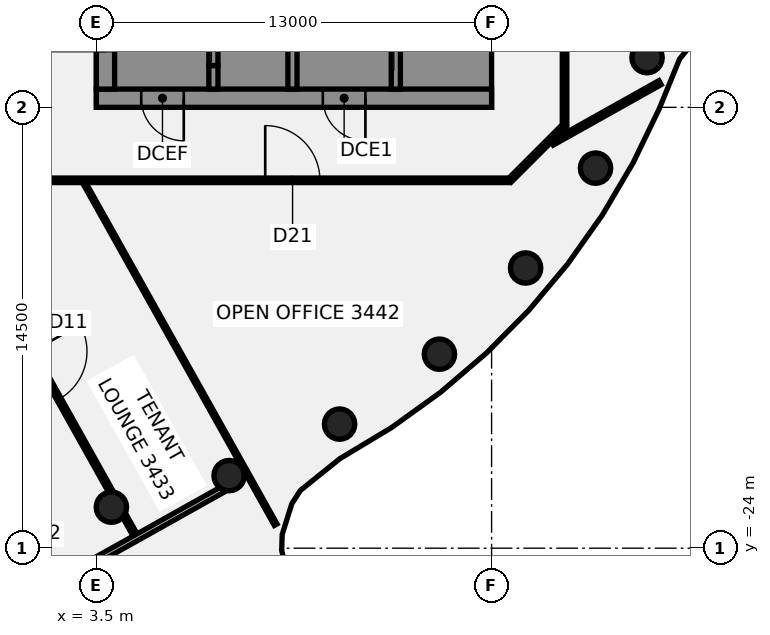
"""IFC4 building model, lengths in metres.
Left out: names, types, materials, properties, quantities, classifications, styles, units other than length and angle.
Written with IfcOpenShell. Run it as: python <this file> out.ifc"""

import sys

from ifc_helpers import new_model, si_unit, direction, frame, frame_2d, origin, origin_2d, place, context, subcontext, project, spatial, polyline, rectangle, circle, outline, extrude, element, fill, save


model = new_model("IFC4")
c1 = context("Model", 3, precision=1e-05, world=origin(), true_north=direction((0.0, 1.0)))
c2 = subcontext(c1, "Body", "Model", "MODEL_VIEW")
j1 = project(units=[si_unit("LENGTHUNIT", "METRE"), si_unit("PLANEANGLEUNIT", "RADIAN")], contexts=[c1])
p1 = place(None, origin())
s1 = spatial("IfcSite", under=j1, at=p1, CompositionType="ELEMENT")
p2 = place(p1, origin())
s2 = spatial("IfcBuilding", under=s1, at=p2, CompositionType="ELEMENT")
p3 = place(p2, frame((0.0, 0.0, 140.5)))
s3 = spatial("IfcBuildingStorey", under=s2, at=p3, CompositionType="ELEMENT", Elevation=140.5)
for number, where, z_axis, x_axis in (
    (1, (3.994, -22.651, -0.14), (0.0, 0.0, 1.0), (1.0, 0.0, 0.0)),
    (2, (7.866, -21.613, -0.14), (0.0, 0.0, 1.0), (1.0, 0.0, 0.0)),
    (3, (11.5, -19.919, -0.14), (0.0, 0.0, 1.0), (1.0, 0.0, 0.0)),
    (4, (14.784, -17.619, -0.14), (0.0, 0.0, 1.0), (1.0, 0.0, 0.0)),
    (5, (17.619, -14.784, -0.14), (0.0, 0.0, 1.0), (1.0, 0.0, 0.0)),
    (6, (19.919, -11.5, -0.14), (0.0, 0.0, 1.0), (1.0, 0.0, 0.0)),
    (7, (21.613, -7.866, -0.14), (0.0, 0.0, 1.0), (1.0, 0.0, 0.0)),
):
    element("IfcColumn", number, at=place(p3, frame(where, z_axis=z_axis, x_axis=x_axis)), inside=s3, PredefinedType="COLUMN", context=c2, shape_type="SweptSolid", body=[
        extrude(circle(Radius=0.5, at=origin_2d()), origin(), (0.0, 0.0, 1.0), 3.75),
    ])
p4 = place(p3, frame((-1.706, -11.996, 0.0), z_axis=(0.0, 0.0, 1.0), x_axis=(0.488648105698, -0.872480961854, 0.0)))
e8 = element("IfcWall", 8, at=p4, inside=s3, PredefinedType="PARTITIONING", context=c2, shape_type="SweptSolid", body=[
    extrude(rectangle(XDim=11.632, YDim=0.15, at=frame_2d((5.816, 0.0))), origin(), (0.0, 0.0, 1.0), 3.01),
])
p5 = place(p4, frame((6.34, 0.0, 0.0)))
e9 = element("IfcOpeningElement", 9, at=p5, cuts=e8, PredefinedType="OPENING", context=c2, shape_type="SweptSolid", body=[
    extrude(rectangle(XDim=1.8, YDim=2.1, at=frame_2d((0.9, 1.05))), frame((0.0, 0.085, 0.0), z_axis=(0.0, -1.0, 0.0), x_axis=(1.0, 0.0, 0.0)), (0.0, 0.0, 1.0), 0.17),
])
p6 = place(p3, frame((4.415, -22.926, 0.0), z_axis=(0.0, 0.0, 1.0), x_axis=(0.488461705481, -0.872585332376, 0.0)))
e10 = element("IfcWall", 10, at=p6, inside=s3, PredefinedType="PARTITIONING", context=c2, shape_type="SweptSolid", body=[
    extrude(rectangle(XDim=0.735, YDim=0.15, at=frame_2d((0.367, 0.0))), origin(), (0.0, 0.0, 1.0), 3.01),
])
p7 = place(p3, frame((3.1, -11.983, 0.0), z_axis=(0.0, 0.0, 1.0), x_axis=(0.488708932558, -0.87244689193, 0.0)))
e11 = element("IfcWall", 11, at=p7, inside=s3, PredefinedType="PARTITIONING", context=c2, shape_type="SweptSolid", body=[
    extrude(rectangle(XDim=12.887, YDim=0.1, at=frame_2d((6.444, 0.0))), origin(), (0.0, 0.0, 1.0), 3.01),
])
p8 = place(p3, frame((-17.1, -11.9, 0.0), z_axis=(0.0, 0.0, 1.0), x_axis=(1.0, 0.0, 0.0)))
e12 = element("IfcWall", 12, at=p8, inside=s3, PredefinedType="PARTITIONING", context=c2, shape_type="SweptSolid", body=[
    extrude(rectangle(XDim=34.165, YDim=0.15, at=frame_2d((17.083, 0.0))), origin(), (0.0, 0.0, 1.0), 3.01),
])
p9 = place(p8, frame((10.546, 0.0, 0.0)))
e13 = element("IfcOpeningElement", 13, at=p9, cuts=e12, PredefinedType="OPENING", context=c2, shape_type="SweptSolid", body=[
    extrude(rectangle(XDim=1.8, YDim=2.1, at=frame_2d((0.9, 1.05))), frame((0.0, 0.085, 0.0), z_axis=(0.0, -1.0, 0.0), x_axis=(1.0, 0.0, 0.0)), (0.0, 0.0, 1.0), 0.17),
])
p10 = place(p8, frame((2.7, 0.0, 0.0)))
e14 = element("IfcOpeningElement", 14, at=p10, cuts=e12, PredefinedType="OPENING", context=c2, shape_type="SweptSolid", body=[
    extrude(rectangle(XDim=1.8, YDim=2.1, at=frame_2d((0.9, 1.05))), frame((0.0, 0.085, 0.0), z_axis=(0.0, -1.0, 0.0), x_axis=(1.0, 0.0, 0.0)), (0.0, 0.0, 1.0), 0.17),
])
p11 = place(p8, frame((26.154, 0.0, 0.0)))
e15 = element("IfcOpeningElement", 15, at=p11, cuts=e12, PredefinedType="OPENING", context=c2, shape_type="SweptSolid", body=[
    extrude(rectangle(XDim=1.8, YDim=2.1, at=frame_2d((0.9, 1.05))), frame((0.0, 0.085, 0.0), z_axis=(0.0, -1.0, 0.0), x_axis=(1.0, 0.0, 0.0)), (0.0, 0.0, 1.0), 0.17),
])
p12 = place(p3, frame((-3.987, -28.59, 0.0), z_axis=(0.0, 0.0, 1.0), x_axis=(0.87241990638, 0.488757104247, 0.0)))
e16 = element("IfcWall", 16, at=p12, inside=s3, PredefinedType="PARTITIONING", context=c2, shape_type="SweptSolid", body=[
    extrude(rectangle(XDim=13.346, YDim=0.2, at=frame_2d((6.673, 0.0))), origin(), (0.0, 0.0, 1.0), 3.01),
])
p13 = place(p12, frame((5.799, 0.0, 0.0)))
e17 = element("IfcOpeningElement", 17, at=p13, cuts=e16, PredefinedType="OPENING", context=c2, shape_type="SweptSolid", body=[
    extrude(rectangle(XDim=1.4, YDim=2.1, at=frame_2d((0.7, 1.05))), frame((0.0, 0.11, 0.0), z_axis=(0.0, -1.0, 0.0), x_axis=(1.0, 0.0, 0.0)), (0.0, 0.0, 1.0), 0.22),
])
p14 = place(p3, frame((18.494, -10.675, 0.0), z_axis=(0.0, 0.0, 1.0), x_axis=(0.872412835083, 0.488769726131, 0.0)))
e18 = element("IfcWall", 18, at=p14, inside=s3, PredefinedType="PARTITIONING", context=c2, shape_type="SweptSolid", body=[
    extrude(rectangle(XDim=4.066, YDim=0.15, at=frame_2d((2.033, 0.0))), origin(), (0.0, 0.0, 1.0), 3.01),
])
p15 = place(p3, frame((17.1, -11.9, 0.0), z_axis=(0.0, 0.0, 1.0), x_axis=(0.707106781187, 0.707106781187, 0.0)))
e19 = element("IfcWall", 19, at=p15, inside=s3, PredefinedType="PARTITIONING", context=c2, shape_type="SweptSolid", body=[
    extrude(rectangle(XDim=2.505, YDim=0.15, at=frame_2d((1.253, 0.0))), origin(), (0.0, 0.0, 1.0), 3.01),
])
p16 = place(p3, frame((18.9, -10.1, 0.0), z_axis=(0.0, 0.0, 1.0), x_axis=(0.0, 1.0, 0.0)))
e20 = element("IfcWall", 20, at=p16, inside=s3, PredefinedType="PARTITIONING", context=c2, shape_type="SweptSolid", body=[
    extrude(rectangle(XDim=20.2, YDim=0.15, at=frame_2d((10.1, 0.0))), origin(), (0.0, 0.0, 1.0), 3.01),
])
p17 = place(p16, frame((8.367, 0.0, 0.0)))
e21 = element("IfcOpeningElement", 21, at=p17, cuts=e20, PredefinedType="OPENING", context=c2, shape_type="SweptSolid", body=[
    extrude(rectangle(XDim=1.8, YDim=2.1, at=frame_2d((0.9, 1.05))), frame((0.0, 0.085, 0.0), z_axis=(0.0, -1.0, 0.0), x_axis=(1.0, 0.0, 0.0)), (0.0, 0.0, 1.0), 0.17),
])
p18 = place(p16, frame((13.611, 0.0, 0.0)))
e22 = element("IfcOpeningElement", 22, at=p18, cuts=e20, PredefinedType="OPENING", context=c2, shape_type="SweptSolid", body=[
    extrude(rectangle(XDim=0.9, YDim=2.1, at=frame_2d((0.45, 1.05))), frame((0.0, 0.085, 0.0), z_axis=(0.0, -1.0, 0.0), x_axis=(1.0, 0.0, 0.0)), (0.0, 0.0, 1.0), 0.17),
])
p19 = place(p3, frame((16.5, -9.2, 0.0), z_axis=(0.0, 0.0, 1.0), x_axis=(-1.0, 0.0, 0.0)))
e23 = element("IfcWall", 23, at=p19, inside=s3, PredefinedType="SHEAR", context=c2, shape_type="SweptSolid", body=[
    extrude(rectangle(XDim=13.0, YDim=0.6, at=frame_2d((6.5, 0.0))), origin(), (0.0, 0.0, 1.0), 3.61),
])
p20 = place(p19, frame((4.15, 0.0, 0.0)))
e24 = element("IfcOpeningElement", 24, at=p20, cuts=e23, PredefinedType="OPENING", context=c2, shape_type="SweptSolid", body=[
    extrude(rectangle(XDim=1.4, YDim=2.1, at=frame_2d((0.7, 1.05))), frame((0.0, 0.31, 0.0), z_axis=(0.0, -1.0, 0.0), x_axis=(1.0, 0.0, 0.0)), (0.0, 0.0, 1.0), 0.62),
])
p21 = place(p19, frame((10.125, 0.0, 0.0)))
e25 = element("IfcOpeningElement", 25, at=p21, cuts=e23, PredefinedType="OPENING", context=c2, shape_type="SweptSolid", body=[
    extrude(rectangle(XDim=1.4, YDim=2.1, at=frame_2d((0.7, 1.05))), frame((0.0, 0.31, 0.0), z_axis=(0.0, -1.0, 0.0), x_axis=(1.0, 0.0, 0.0)), (0.0, 0.0, 1.0), 0.62),
])
p22 = place(p3, origin())
e26 = element("IfcWall", 26, at=p22, inside=s3, PredefinedType="SHEAR", context=c2, shape_type="SweptSolid", body=[
    extrude(outline(polyline([(13.5, -8.125), (13.5, -8.9), (15.9, -8.9), (16.5, -8.9), (16.5, 8.9), (15.9, 8.9), (13.5, 8.9), (13.5, 8.125), (15.9, 8.125), (15.9, 5.625), (13.5, 5.625), (13.5, 5.375), (15.9, 5.375), (15.9, -5.375), (13.5, -5.375), (13.5, -5.625), (15.9, -5.625), (15.9, -8.125), (13.5, -8.125)])), origin(), (0.0, 0.0, 1.0), 3.61),
])
p23 = place(p3, origin())
e27 = element("IfcWall", 27, at=p23, inside=s3, PredefinedType="SHEAR", context=c2, shape_type="SweptSolid", body=[
    extrude(outline(polyline([(7.5, -8.125), (7.5, -8.9), (9.8, -8.9), (9.8, -8.125), (9.8, -5.625), (9.55, -5.625), (9.55, -8.125), (7.5, -8.125)])), origin(), (0.0, 0.0, 1.0), 3.61),
])
p24 = place(p3, frame((7.35, -8.9, 0.0), z_axis=(0.0, 0.0, 1.0), x_axis=(0.0, 1.0, 0.0)))
e28 = element("IfcWall", 28, at=p24, inside=s3, PredefinedType="SHEAR", context=c2, shape_type="SweptSolid", body=[
    extrude(rectangle(XDim=0.775, YDim=0.3, at=frame_2d((0.387, 0.0))), origin(), (0.0, 0.0, 1.0), 3.61),
])
p25 = place(p3, frame((13.35, -8.9, 0.0), z_axis=(0.0, 0.0, 1.0), x_axis=(0.0, 1.0, 0.0)))
e29 = element("IfcWall", 29, at=p25, inside=s3, PredefinedType="SHEAR", context=c2, shape_type="SweptSolid", body=[
    extrude(rectangle(XDim=17.8, YDim=0.3, at=frame_2d((8.9, 0.0))), origin(), (0.0, 0.0, 1.0), 3.61),
])
p26 = place(p25, frame((1.325, 0.0, 0.0)))
e30 = element("IfcOpeningElement", 30, at=p26, cuts=e29, PredefinedType="OPENING", context=c2, shape_type="SweptSolid", body=[
    extrude(rectangle(XDim=1.4, YDim=2.1, at=frame_2d((0.7, 1.05))), frame((0.0, 0.16, 0.0), z_axis=(0.0, -1.0, 0.0), x_axis=(1.0, 0.0, 0.0)), (0.0, 0.0, 1.0), 0.32),
])
p27 = place(p25, frame((6.546, 0.0, 0.0)))
e31 = element("IfcOpeningElement", 31, at=p27, cuts=e29, PredefinedType="OPENING", context=c2, shape_type="SweptSolid", body=[
    extrude(rectangle(XDim=1.0, YDim=2.1, at=frame_2d((0.5, 1.05))), frame((0.0, 0.16, 0.0), z_axis=(0.0, -1.0, 0.0), x_axis=(1.0, 0.0, 0.0)), (0.0, 0.0, 1.0), 0.32),
])
p28 = place(p25, frame((12.046, 0.0, 0.0)))
e32 = element("IfcOpeningElement", 32, at=p28, cuts=e29, PredefinedType="OPENING", context=c2, shape_type="SweptSolid", body=[
    extrude(rectangle(XDim=1.0, YDim=2.1, at=frame_2d((0.5, 1.05))), frame((0.0, 0.16, 0.0), z_axis=(0.0, -1.0, 0.0), x_axis=(1.0, 0.0, 0.0)), (0.0, 0.0, 1.0), 0.32),
])
p29 = place(p3, frame((9.95, -8.9, 0.0), z_axis=(0.0, 0.0, 1.0), x_axis=(0.0, 1.0, 0.0)))
e33 = element("IfcWall", 33, at=p29, inside=s3, PredefinedType="SHEAR", context=c2, shape_type="SweptSolid", body=[
    extrude(rectangle(XDim=17.8, YDim=0.3, at=frame_2d((8.9, 0.0))), origin(), (0.0, 0.0, 1.0), 3.61),
])
p30 = place(p29, frame((4.175, 0.0, 0.0)))
e34 = element("IfcOpeningElement", 34, at=p30, cuts=e33, PredefinedType="OPENING", context=c2, shape_type="SweptSolid", body=[
    extrude(rectangle(XDim=1.2, YDim=2.1, at=frame_2d((0.6, 1.05))), frame((0.0, 0.16, 0.0), z_axis=(0.0, -1.0, 0.0), x_axis=(1.0, 0.0, 0.0)), (0.0, 0.0, 1.0), 0.32),
])
p31 = place(p29, frame((6.925, 0.0, 0.0)))
e35 = element("IfcOpeningElement", 35, at=p31, cuts=e33, PredefinedType="OPENING", context=c2, shape_type="SweptSolid", body=[
    extrude(rectangle(XDim=1.2, YDim=2.1, at=frame_2d((0.6, 1.05))), frame((0.0, 0.16, 0.0), z_axis=(0.0, -1.0, 0.0), x_axis=(1.0, 0.0, 0.0)), (0.0, 0.0, 1.0), 0.32),
])
p32 = place(p3, frame((7.35, -8.125, 0.0), z_axis=(0.0, 0.0, 1.0), x_axis=(0.0, 1.0, 0.0)))
e36 = element("IfcWall", 36, at=p32, inside=s3, PredefinedType="SHEAR", context=c2, shape_type="SweptSolid", body=[
    extrude(rectangle(XDim=2.5, YDim=0.3, at=frame_2d((1.25, 0.0))), origin(), (0.0, 0.0, 1.0), 3.61),
])
p33 = place(p32, frame((0.7, 0.0, 0.0)))
e37 = element("IfcOpeningElement", 37, at=p33, cuts=e36, PredefinedType="OPENING", context=c2, shape_type="SweptSolid", body=[
    extrude(rectangle(XDim=1.1, YDim=2.1, at=frame_2d((0.55, 1.05))), frame((0.0, 0.16, 0.0), z_axis=(0.0, -1.0, 0.0), x_axis=(1.0, 0.0, 0.0)), (0.0, 0.0, 1.0), 0.32),
])
p34 = place(p3, frame((3.8, -8.9, 0.0), z_axis=(0.0, 0.0, 1.0), x_axis=(0.0, 1.0, 0.0)))
e38 = element("IfcWall", 38, at=p34, inside=s3, PredefinedType="SHEAR", context=c2, shape_type="SweptSolid", body=[
    extrude(rectangle(XDim=17.8, YDim=0.6, at=frame_2d((8.9, 0.0))), origin(), (0.0, 0.0, 1.0), 3.61),
])
p35 = place(p34, frame((1.25, 0.0, 0.0)))
e39 = element("IfcOpeningElement", 39, at=p35, cuts=e38, PredefinedType="OPENING", context=c2, shape_type="SweptSolid", body=[
    extrude(rectangle(XDim=1.8, YDim=2.1, at=frame_2d((0.9, 1.05))), frame((0.0, 0.31, 0.0), z_axis=(0.0, -1.0, 0.0), x_axis=(1.0, 0.0, 0.0)), (0.0, 0.0, 1.0), 0.62),
])
p36 = place(p34, frame((13.8, 0.0, 0.0)))
e40 = element("IfcOpeningElement", 40, at=p36, cuts=e38, PredefinedType="OPENING", context=c2, shape_type="SweptSolid", body=[
    extrude(rectangle(XDim=1.0, YDim=2.1, at=frame_2d((0.5, 1.05))), frame((0.0, 0.31, 0.0), z_axis=(0.0, -1.0, 0.0), x_axis=(1.0, 0.0, 0.0)), (0.0, 0.0, 1.0), 0.62),
])
p37 = place(p5, origin())
e41 = element("IfcDoor", 41, at=p37, inside=s3, OperationType="DOUBLE_DOOR_SINGLE_SWING", PredefinedType="DOOR", context=c2, shape_type="SweptSolid", body=[
    extrude(rectangle(XDim=1.8, YDim=2.1, at=frame_2d((0.9, 1.05))), frame((0.0, 0.025, 0.0), z_axis=(0.0, -1.0, 0.0), x_axis=(1.0, 0.0, 0.0)), (0.0, 0.0, 1.0), 0.05),
])
fill(e9, e41)
p38 = place(p11, frame((1.8, 0.0, 0.0), z_axis=(0.0, 0.0, 1.0), x_axis=(-1.0, 0.0, 0.0)))
e42 = element("IfcDoor", 42, at=p38, inside=s3, OperationType="DOUBLE_DOOR_SINGLE_SWING", PredefinedType="DOOR", context=c2, shape_type="SweptSolid", body=[
    extrude(rectangle(XDim=1.8, YDim=2.1, at=frame_2d((0.9, 1.05))), frame((0.0, 0.025, 0.0), z_axis=(0.0, -1.0, 0.0), x_axis=(1.0, 0.0, 0.0)), (0.0, 0.0, 1.0), 0.05),
])
fill(e15, e42)
p39 = place(p20, origin())
e43 = element("IfcDoor", 43, at=p39, inside=s3, OperationType="SINGLE_SWING_LEFT", PredefinedType="DOOR", context=c2, shape_type="SweptSolid", body=[
    extrude(rectangle(XDim=1.4, YDim=2.1, at=frame_2d((0.7, 1.05))), frame((0.0, 0.025, 0.0), z_axis=(0.0, -1.0, 0.0), x_axis=(1.0, 0.0, 0.0)), (0.0, 0.0, 1.0), 0.05),
])
fill(e24, e43)
p40 = place(p21, origin())
e44 = element("IfcDoor", 44, at=p40, inside=s3, OperationType="SINGLE_SWING_LEFT", PredefinedType="DOOR", context=c2, shape_type="SweptSolid", body=[
    extrude(rectangle(XDim=1.4, YDim=2.1, at=frame_2d((0.7, 1.05))), frame((0.0, 0.025, 0.0), z_axis=(0.0, -1.0, 0.0), x_axis=(1.0, 0.0, 0.0)), (0.0, 0.0, 1.0), 0.05),
])
fill(e25, e44)
save(model, sys.argv[1])
